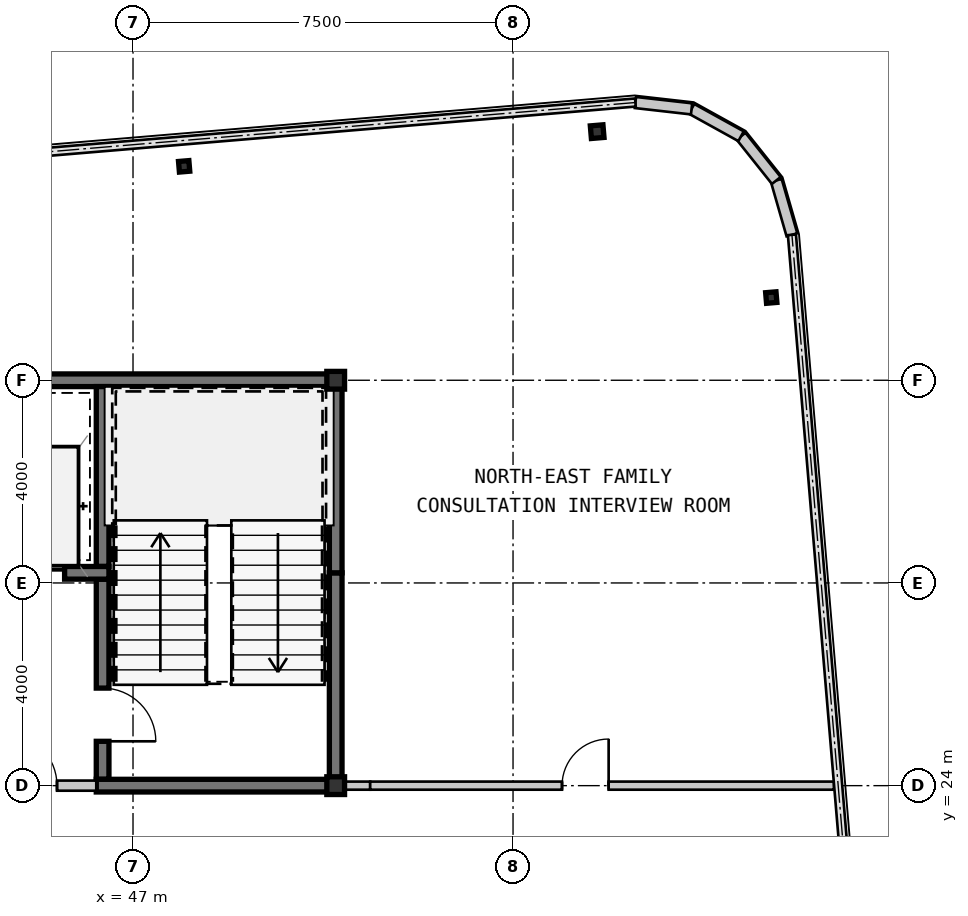
"""IFC4 building model, lengths in metres.
Left out: names, types, materials, properties, quantities, classifications, styles, units other than length and angle.
Written with IfcOpenShell. Run it as: python <this file> out.ifc"""

import sys

from ifc_helpers import new_model, si_unit, direction, frame, frame_2d, origin, origin_2d, place, context, subcontext, project, spatial, rectangle, hollow_rectangle, i_section, extrude, source, transform, mapped, element, fill, save


model = new_model("IFC4")
c1 = context("Model", 3, precision=1e-05, world=origin(), true_north=direction((0.0, 1.0)))
c2 = subcontext(c1, "Body", "Model", "MODEL_VIEW")
j1 = project(units=[si_unit("LENGTHUNIT", "METRE"), si_unit("PLANEANGLEUNIT", "RADIAN")], contexts=[c1])
p1 = place(None, origin())
s1 = spatial("IfcSite", under=j1, at=p1, CompositionType="ELEMENT")
p2 = place(p1, origin())
s2 = spatial("IfcBuilding", under=s1, at=p2, CompositionType="ELEMENT")
p3 = place(p2, frame((0.0, 0.0, 178.85)))
s3 = spatial("IfcBuildingStorey", under=s2, at=p3, CompositionType="ELEMENT", Elevation=178.85)
m1 = source(origin(), c2, "Body", "SweptSolid", [
    extrude(hollow_rectangle(XDim=0.35, YDim=0.35, WallThickness=0.016, at=origin_2d()), origin(), (0.0, 0.0, 1.0), 3.15),
])
for number, where, z_axis, x_axis in (
    (1, (51.0, 24.0, 0.0), (0.0, 0.0, 1.0), (1.0, 0.0, 0.0)),
    (2, (51.0, 32.0, 0.0), (0.0, 0.0, 1.0), (1.0, 0.0, 0.0)),
):
    element("IfcColumn", number, at=place(p3, frame(where, z_axis=z_axis, x_axis=x_axis)), inside=s3, PredefinedType="COLUMN", context=c2, shape_type="MappedRepresentation", body=[
        mapped(m1, transform((0.0, 0.0, 0.0), scale=1.0)),
    ])
m2 = source(origin(), c2, "Body", "SweptSolid", [
    extrude(i_section(OverallWidth=0.205, OverallDepth=0.21, WebThickness=0.009, FlangeThickness=0.014, at=origin_2d()), origin(), (0.0, 0.0, 1.0), 3.15),
])
p4 = place(p3, frame((48.009, 36.221, 0.0), z_axis=(0.0, 0.0, 1.0), x_axis=(0.99649285925, 0.083677843332, 0.0)))
e3 = element("IfcColumn", 3, at=p4, inside=s3, PredefinedType="COLUMN", context=c2, shape_type="MappedRepresentation", body=[
    mapped(m2, transform((0.0, 0.0, 0.0), scale=1.0)),
])
m3 = source(origin(), c2, "Body", "SweptSolid", [
    extrude(hollow_rectangle(XDim=0.25, YDim=0.25, WallThickness=0.01, at=origin_2d()), origin(), (0.0, 0.0, 1.0), 3.15),
])
p5 = place(p3, frame((56.16, 36.906, 0.0), z_axis=(0.0, 0.0, 1.0), x_axis=(0.99649285925, 0.083677843332, 0.0)))
e4 = element("IfcColumn", 4, at=p5, inside=s3, PredefinedType="COLUMN", context=c2, shape_type="MappedRepresentation", body=[
    mapped(m3, transform((0.0, 0.0, 0.0), scale=1.0)),
])
p6 = place(p3, frame((59.596, 33.632, 0.0), z_axis=(0.0, 0.0, 1.0), x_axis=(0.99649285925, 0.083677843332, 0.0)))
e5 = element("IfcColumn", 5, at=p6, inside=s3, PredefinedType="COLUMN", context=c2, shape_type="MappedRepresentation", body=[
    mapped(m2, transform((0.0, 0.0, 0.0), scale=1.0)),
])
m4 = source(origin(), c2, "Body", "SweptSolid", [
    extrude(rectangle(XDim=1.116, YDim=0.22, at=frame_2d((0.558, 0.0))), origin(), (0.0, 0.0, 1.0), 2.93),
])
for number, where, z_axis, x_axis in (
    (6, (60.004, 34.87, 0.0), (0.0, 0.0, 1.0), (-0.277, 0.961, 0.0)),
    (7, (59.696, 35.943, 0.0), (0.0, 0.0, 1.0), (-0.623, 0.782, 0.0)),
    (8, (59.0, 36.816, 0.0), (0.0, 0.0, 1.0), (-0.875, 0.484, 0.0)),
    (9, (58.024, 37.356, 0.0), (0.0, 0.0, 1.0), (-0.994, 0.112, 0.0)),
):
    element("IfcWall", number, at=place(p3, frame(where, z_axis=z_axis, x_axis=x_axis)), inside=s3, PredefinedType="SOLIDWALL", context=c2, shape_type="MappedRepresentation", body=[
        mapped(m4, transform((0.0, 0.0, 0.0), scale=1.0)),
    ])
m5 = source(origin(), c2, "Body", "SweptSolid", [
    extrude(rectangle(XDim=11.925, YDim=0.25, at=frame_2d((5.962, 0.0))), origin(), (0.0, 0.0, 1.0), 2.93),
])
p7 = place(p3, frame((39.2, 32.0, 0.0), z_axis=(0.0, 0.0, 1.0), x_axis=(1.0, 0.0, 0.0)))
e10 = element("IfcWall", 10, at=p7, inside=s3, PredefinedType="SHEAR", context=c2, shape_type="MappedRepresentation", body=[
    mapped(m5, transform((0.0, 0.0, 0.0), scale=1.0)),
])
m6 = source(origin(), c2, "Body", "SweptSolid", [
    extrude(rectangle(XDim=4.075, YDim=0.25, at=frame_2d((2.038, 0.0))), origin(), (0.0, 0.0, 1.0), 2.93),
])
p8 = place(p3, frame((51.0, 24.125, 0.0), z_axis=(0.0, 0.0, 1.0), x_axis=(0.0, 1.0, 0.0)))
e11 = element("IfcWall", 11, at=p8, inside=s3, PredefinedType="SHEAR", context=c2, shape_type="MappedRepresentation", body=[
    mapped(m6, transform((0.0, 0.0, 0.0), scale=1.0)),
])
m7 = source(origin(), c2, "Body", "SweptSolid", [
    extrude(rectangle(XDim=3.675, YDim=0.25, at=frame_2d((1.837, 0.0))), origin(), (0.0, 0.0, 1.0), 2.93),
])
p9 = place(p3, frame((51.0, 28.2, 0.0), z_axis=(0.0, 0.0, 1.0), x_axis=(0.0, 1.0, 0.0)))
e12 = element("IfcWall", 12, at=p9, inside=s3, PredefinedType="SHEAR", context=c2, shape_type="MappedRepresentation", body=[
    mapped(m7, transform((0.0, 0.0, 0.0), scale=1.0)),
])
m8 = source(origin(), c2, "Body", "SweptSolid", [
    extrude(rectangle(XDim=3.55, YDim=0.25, at=frame_2d((1.775, 0.0))), origin(), (0.0, 0.0, 1.0), 2.93),
])
p10 = place(p3, frame((46.4, 31.875, 0.0), z_axis=(0.0, 0.0, 1.0), x_axis=(0.0, -1.0, 0.0)))
e13 = element("IfcWall", 13, at=p10, inside=s3, PredefinedType="SHEAR", context=c2, shape_type="MappedRepresentation", body=[
    mapped(m8, transform((0.0, 0.0, 0.0), scale=1.0)),
])
m9 = source(origin(), c2, "Body", "SweptSolid", [
    extrude(rectangle(XDim=3.95, YDim=0.25, at=frame_2d((1.975, 0.0))), origin(), (0.0, 0.0, 1.0), 2.93),
])
p11 = place(p3, frame((46.4, 28.075, 0.0), z_axis=(0.0, 0.0, 1.0), x_axis=(0.0, -1.0, 0.0)))
e14 = element("IfcWall", 14, at=p11, inside=s3, PredefinedType="SHEAR", context=c2, shape_type="MappedRepresentation", body=[
    mapped(m9, transform((0.0, 0.0, 0.0), scale=1.0)),
])
m10 = source(origin(), c2, "Body", "SweptSolid", [
    extrude(rectangle(XDim=1.05, YDim=2.1, at=frame_2d((0.525, 1.05))), frame((0.0, 0.135, 0.0), z_axis=(0.0, -1.0, 0.0), x_axis=(1.0, 0.0, 0.0)), (0.0, 0.0, 1.0), 0.27),
])
p12 = place(p11, frame((2.15, 0.0, 0.0)))
e15 = element("IfcOpeningElement", 15, at=p12, cuts=e14, PredefinedType="OPENING", context=c2, shape_type="MappedRepresentation", body=[
    mapped(m10, transform((0.0, 0.0, 0.0), scale=1.0)),
])
m11 = source(origin(), c2, "Body", "SweptSolid", [
    extrude(rectangle(XDim=4.85, YDim=0.25, at=frame_2d((2.425, 0.0))), origin(), (0.0, 0.0, 1.0), 2.93),
])
p13 = place(p3, frame((46.275, 24.0, 0.0), z_axis=(0.0, 0.0, 1.0), x_axis=(1.0, 0.0, 0.0)))
e16 = element("IfcWall", 16, at=p13, inside=s3, PredefinedType="SHEAR", context=c2, shape_type="MappedRepresentation", body=[
    mapped(m11, transform((0.0, 0.0, 0.0), scale=1.0)),
])
m12 = source(origin(), c2, "Body", "SweptSolid", [
    extrude(rectangle(XDim=2.85, YDim=0.25, at=frame_2d((1.425, 0.0))), origin(), (0.0, 0.0, 1.0), 2.93),
])
p14 = place(p3, frame((43.675, 28.2, 0.0), z_axis=(0.0, 0.0, 1.0), x_axis=(1.0, 0.0, 0.0)))
e17 = element("IfcWall", 17, at=p14, inside=s3, PredefinedType="SHEAR", context=c2, shape_type="MappedRepresentation", body=[
    mapped(m12, transform((0.0, 0.0, 0.0), scale=1.0)),
])
m13 = source(origin(), c2, "Body", "SweptSolid", [
    extrude(rectangle(XDim=1.1, YDim=2.15, at=frame_2d((0.55, 1.075))), frame((0.0, 0.135, 0.0), z_axis=(0.0, -1.0, 0.0), x_axis=(1.0, 0.0, 0.0)), (0.0, 0.0, 1.0), 0.27),
])
p15 = place(p14, frame((0.875, 0.0, 0.0)))
e18 = element("IfcOpeningElement", 18, at=p15, cuts=e17, PredefinedType="OPENING", context=c2, shape_type="MappedRepresentation", body=[
    mapped(m13, transform((0.0, 0.0, 0.0), scale=1.0)),
])
m14 = source(origin(), c2, "Body", "SweptSolid", [
    extrude(rectangle(XDim=2.725, YDim=0.2, at=frame_2d((1.362, 0.0))), origin(), (0.0, 0.0, 1.0), 2.397),
])
p16 = place(p3, frame((43.55, 24.0, 0.0), z_axis=(0.0, 0.0, 1.0), x_axis=(1.0, 0.0, 0.0)))
e19 = element("IfcWall", 19, at=p16, inside=s3, PredefinedType="SOLIDWALL", context=c2, shape_type="MappedRepresentation", body=[
    mapped(m14, transform((0.0, 0.0, 0.0), scale=1.0)),
])
m15 = source(origin(), c2, "Body", "SweptSolid", [
    extrude(rectangle(XDim=1.05, YDim=2.1, at=frame_2d((0.525, 1.05))), frame((0.0, 0.11, 0.0), z_axis=(0.0, -1.0, 0.0), x_axis=(1.0, 0.0, 0.0)), (0.0, 0.0, 1.0), 0.22),
])
p17 = place(p16, frame((0.9, 0.0, 0.0)))
e20 = element("IfcOpeningElement", 20, at=p17, cuts=e19, PredefinedType="OPENING", context=c2, shape_type="MappedRepresentation", body=[
    mapped(m15, transform((0.0, 0.0, 0.0), scale=1.0)),
])
m16 = source(origin(), c2, "Body", "SweptSolid", [
    extrude(rectangle(XDim=0.556, YDim=0.16, at=frame_2d((0.278, 0.0))), origin(), (0.0, 0.0, 1.0), 2.47),
])
p18 = place(p3, frame((51.125, 24.0, 0.0), z_axis=(0.0, 0.0, 1.0), x_axis=(1.0, 0.0, 0.0)))
e21 = element("IfcWall", 21, at=p18, inside=s3, PredefinedType="PARTITIONING", context=c2, shape_type="MappedRepresentation", body=[
    mapped(m16, transform((0.0, 0.0, 0.0), scale=1.0)),
])
m17 = source(origin(), c2, "Body", "SweptSolid", [
    extrude(rectangle(XDim=9.153, YDim=0.16, at=frame_2d((4.576, 0.0))), origin(), (0.0, 0.0, 1.0), 2.93),
])
p19 = place(p3, frame((51.681, 24.0, 0.0), z_axis=(0.0, 0.0, 1.0), x_axis=(1.0, 0.0, 0.0)))
e22 = element("IfcWall", 22, at=p19, inside=s3, PredefinedType="PARTITIONING", context=c2, shape_type="MappedRepresentation", body=[
    mapped(m17, transform((0.0, 0.0, 0.0), scale=1.0)),
])
m18 = source(origin(), c2, "Body", "SweptSolid", [
    extrude(rectangle(XDim=0.92, YDim=2.1, at=frame_2d((0.46, 1.05))), frame((0.0, 0.09, 0.0), z_axis=(0.0, -1.0, 0.0), x_axis=(1.0, 0.0, 0.0)), (0.0, 0.0, 1.0), 0.18),
])
p20 = place(p19, frame((3.786, 0.0, 0.0)))
e23 = element("IfcOpeningElement", 23, at=p20, cuts=e22, PredefinedType="OPENING", context=c2, shape_type="MappedRepresentation", body=[
    mapped(m18, transform((0.0, 0.0, 0.0), scale=1.0)),
])
m19 = source(origin(), c2, "Body", "SweptSolid", [
    extrude(rectangle(XDim=1.05, YDim=2.1, at=frame_2d((0.525, 1.05))), frame((0.0, 0.025, 0.0), z_axis=(0.0, -1.0, 0.0), x_axis=(1.0, 0.0, 0.0)), (0.0, 0.0, 1.0), 0.05),
])
p21 = place(p12, origin())
e24 = element("IfcDoor", 24, at=p21, inside=s3, OperationType="SINGLE_SWING_RIGHT", PredefinedType="DOOR", context=c2, shape_type="MappedRepresentation", body=[
    mapped(m19, transform((0.0, 0.0, 0.0), scale=1.0)),
])
fill(e15, e24)
m20 = source(origin(), c2, "Body", "SweptSolid", [
    extrude(rectangle(XDim=1.1, YDim=2.15, at=frame_2d((0.55, 1.075))), frame((0.0, 0.025, 0.0), z_axis=(0.0, -1.0, 0.0), x_axis=(1.0, 0.0, 0.0)), (0.0, 0.0, 1.0), 0.05),
])
p22 = place(p15, origin())
e25 = element("IfcDoor", 25, at=p22, inside=s3, OperationType="SLIDING_TO_LEFT", PredefinedType="DOOR", context=c2, shape_type="MappedRepresentation", body=[
    mapped(m20, transform((0.0, 0.0, 0.0), scale=1.0)),
])
fill(e18, e25)
p23 = place(p17, origin())
e26 = element("IfcDoor", 26, at=p23, inside=s3, OperationType="SINGLE_SWING_LEFT", PredefinedType="DOOR", context=c2, shape_type="MappedRepresentation", body=[
    mapped(m19, transform((0.0, 0.0, 0.0), scale=1.0)),
])
fill(e20, e26)
m21 = source(origin(), c2, "Body", "SweptSolid", [
    extrude(rectangle(XDim=0.92, YDim=2.1, at=frame_2d((0.46, 1.05))), frame((0.0, 0.025, 0.0), z_axis=(0.0, -1.0, 0.0), x_axis=(1.0, 0.0, 0.0)), (0.0, 0.0, 1.0), 0.05),
])
p24 = place(p20, origin())
e27 = element("IfcDoor", 27, at=p24, inside=s3, OperationType="SINGLE_SWING_RIGHT", PredefinedType="DOOR", context=c2, shape_type="MappedRepresentation", body=[
    mapped(m21, transform((0.0, 0.0, 0.0), scale=1.0)),
])
fill(e23, e27)
save(model, sys.argv[1])
